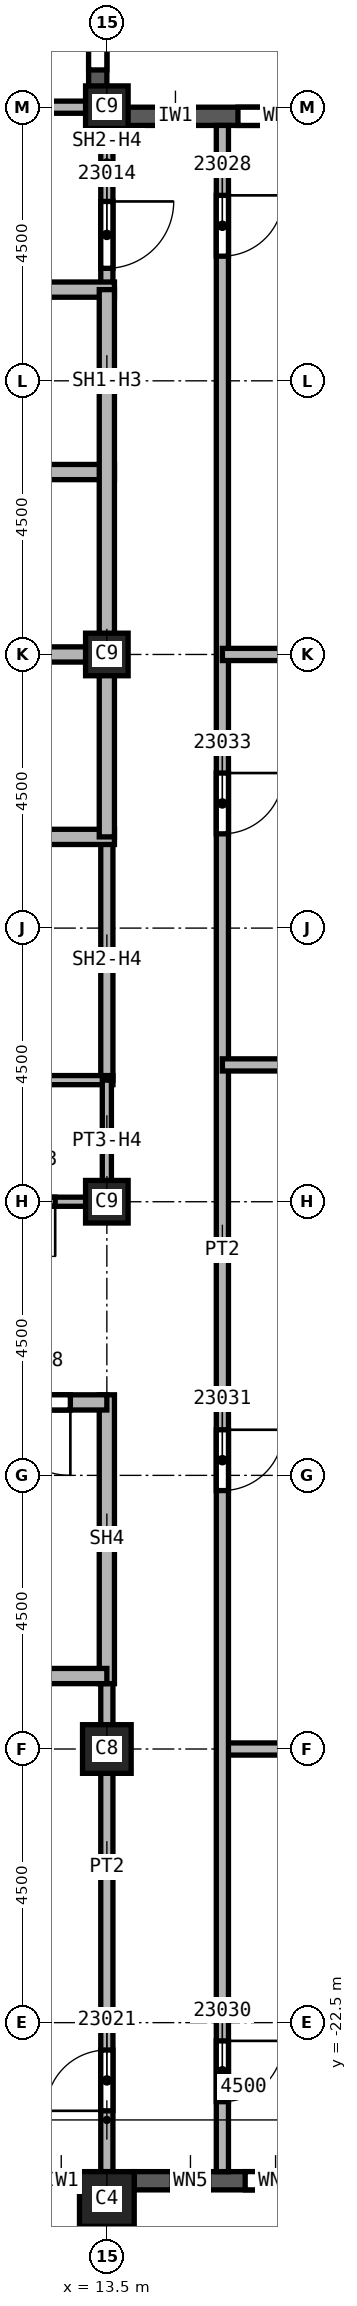
"""IFC4 building model, lengths in metres.
Left out: names, types, materials, properties, quantities, classifications, styles, units other than length and angle.
Written with IfcOpenShell. Run it as: python <this file> out.ifc"""

import sys

from ifc_helpers import new_model, si_unit, direction, frame, frame_2d, origin, origin_2d, place, context, subcontext, project, spatial, rectangle, extrude, element, fill, save


model = new_model("IFC4")
c1 = context("Model", 3, precision=1e-05, world=origin(), true_north=direction((0.0, 1.0)))
c2 = subcontext(c1, "Body", "Model", "MODEL_VIEW")
j1 = project(units=[si_unit("LENGTHUNIT", "METRE"), si_unit("PLANEANGLEUNIT", "RADIAN")], contexts=[c1])
p1 = place(None, origin())
s1 = spatial("IfcSite", under=j1, at=p1, CompositionType="ELEMENT")
p2 = place(p1, origin())
s2 = spatial("IfcBuilding", under=s1, at=p2, CompositionType="ELEMENT")
p3 = place(p2, frame((0.0, 0.0, 326.0)))
s3 = spatial("IfcBuildingStorey", under=s2, at=p3, CompositionType="ELEMENT", Elevation=326.0)
p4 = place(p3, frame((13.5, -18.0, 0.0), z_axis=(0.0, 0.0, 1.0), x_axis=(1.0, 0.0, 0.0)))
e1 = element("IfcColumn", 1, at=p4, inside=s3, PredefinedType="COLUMN", context=c2, shape_type="SweptSolid", body=[
    extrude(rectangle(XDim=0.8, YDim=0.8, at=origin_2d()), origin(), (0.0, 0.0, 1.0), 3.74),
])
for number, where, z_axis, x_axis in (
    (2, (13.5, 0.0, 0.0), (0.0, 0.0, 1.0), (1.0, 0.0, 0.0)),
    (3, (13.5, 9.0, 0.0), (0.0, 0.0, 1.0), (1.0, 0.0, 0.0)),
    (4, (13.5, -9.0, 0.0), (0.0, 0.0, 1.0), (1.0, 0.0, 0.0)),
):
    element("IfcColumn", number, at=place(p3, frame(where, z_axis=z_axis, x_axis=x_axis)), inside=s3, PredefinedType="COLUMN", context=c2, shape_type="SweptSolid", body=[
        extrude(rectangle(XDim=0.7, YDim=0.7, at=origin_2d()), origin(), (0.0, 0.0, 1.0), 3.74),
    ])
p5 = place(p3, frame((13.5, -25.4, 0.0), z_axis=(0.0, 0.0, 1.0), x_axis=(1.0, 0.0, 0.0)))
e5 = element("IfcColumn", 5, at=p5, inside=s3, PredefinedType="COLUMN", context=c2, shape_type="SweptSolid", body=[
    extrude(rectangle(XDim=0.9, YDim=0.9, at=origin_2d()), origin(), (0.0, 0.0, 1.0), 3.74),
])
p6 = place(p3, frame((9.45, -25.1, 0.0), z_axis=(0.0, 0.0, 1.0), x_axis=(1.0, 0.0, 0.0)))
e6 = element("IfcWall", 6, at=p6, inside=s3, PredefinedType="SOLIDWALL", context=c2, shape_type="SweptSolid", body=[
    extrude(rectangle(XDim=3.6, YDim=0.3, at=frame_2d((1.8, 0.0))), origin(), (0.0, 0.0, 1.0), 3.14),
])
p7 = place(p6, frame((0.6, 0.0, 0.8)))
e7 = element("IfcOpeningElement", 7, at=p7, cuts=e6, PredefinedType="OPENING", context=c2, shape_type="SweptSolid", body=[
    extrude(rectangle(XDim=2.4, YDim=1.95, at=frame_2d((1.2, 0.975))), frame((0.0, 0.15, 0.0), z_axis=(0.0, -1.0, 0.0), x_axis=(1.0, 0.0, 0.0)), (0.0, 0.0, 1.0), 0.3),
])
p8 = place(p3, frame((13.95, -25.1, 0.0), z_axis=(0.0, 0.0, 1.0), x_axis=(1.0, 0.0, 0.0)))
e8 = element("IfcWall", 8, at=p8, inside=s3, PredefinedType="SOLIDWALL", context=c2, shape_type="SweptSolid", body=[
    extrude(rectangle(XDim=3.6, YDim=0.3, at=frame_2d((1.8, 0.0))), origin(), (0.0, 0.0, 1.0), 3.14),
])
p9 = place(p8, frame((0.625, 0.0, 0.8)))
e9 = element("IfcOpeningElement", 9, at=p9, cuts=e8, PredefinedType="OPENING", context=c2, shape_type="SweptSolid", body=[
    extrude(rectangle(XDim=0.6, YDim=1.95, at=frame_2d((0.3, 0.975))), frame((0.0, 0.15, 0.0), z_axis=(0.0, -1.0, 0.0), x_axis=(1.0, 0.0, 0.0)), (0.0, 0.0, 1.0), 0.3),
])
p10 = place(p8, frame((1.825, 0.0, 0.8)))
e10 = element("IfcOpeningElement", 10, at=p10, cuts=e8, PredefinedType="OPENING", context=c2, shape_type="SweptSolid", body=[
    extrude(rectangle(XDim=1.0, YDim=1.95, at=frame_2d((0.5, 0.975))), frame((0.0, 0.15, 0.0), z_axis=(0.0, -1.0, 0.0), x_axis=(1.0, 0.0, 0.0)), (0.0, 0.0, 1.0), 0.3),
])
p11 = place(p3, frame((13.35, 9.05, 0.0), z_axis=(0.0, 0.0, 1.0), x_axis=(0.0, 1.0, 0.0)))
e11 = element("IfcWall", 11, at=p11, inside=s3, PredefinedType="SOLIDWALL", context=c2, shape_type="SweptSolid", body=[
    extrude(rectangle(XDim=8.55, YDim=0.3, at=frame_2d((4.275, 0.0))), origin(), (0.0, 0.0, 1.0), 3.14),
])
p12 = place(p11, frame((0.562, 0.0, 0.8)))
e12 = element("IfcOpeningElement", 12, at=p12, cuts=e11, PredefinedType="OPENING", context=c2, shape_type="SweptSolid", body=[
    extrude(rectangle(XDim=2.4, YDim=1.95, at=frame_2d((1.2, 0.975))), frame((0.0, 0.15, 0.0), z_axis=(0.0, -1.0, 0.0), x_axis=(1.0, 0.0, 0.0)), (0.0, 0.0, 1.0), 0.3),
])
p13 = place(p11, frame((4.688, 0.0, 0.8)))
e13 = element("IfcOpeningElement", 13, at=p13, cuts=e11, PredefinedType="OPENING", context=c2, shape_type="SweptSolid", body=[
    extrude(rectangle(XDim=2.4, YDim=1.95, at=frame_2d((1.2, 0.975))), frame((0.0, 0.15, 0.0), z_axis=(0.0, -1.0, 0.0), x_axis=(1.0, 0.0, 0.0)), (0.0, 0.0, 1.0), 0.3),
])
p14 = place(p3, frame((22.1, 8.85, 0.0), z_axis=(0.0, 0.0, 1.0), x_axis=(-1.0, 0.0, 0.0)))
e14 = element("IfcWall", 14, at=p14, inside=s3, PredefinedType="SOLIDWALL", context=c2, shape_type="SweptSolid", body=[
    extrude(rectangle(XDim=8.55, YDim=0.3, at=frame_2d((4.275, 0.0))), origin(), (0.0, 0.0, 1.0), 3.14),
])
p15 = place(p14, frame((1.756, 0.0, 0.8)))
e15 = element("IfcOpeningElement", 15, at=p15, cuts=e14, PredefinedType="OPENING", context=c2, shape_type="SweptSolid", body=[
    extrude(rectangle(XDim=1.4, YDim=1.95, at=frame_2d((0.7, 0.975))), frame((0.0, 0.15, 0.0), z_axis=(0.0, -1.0, 0.0), x_axis=(1.0, 0.0, 0.0)), (0.0, 0.0, 1.0), 0.3),
])
p16 = place(p14, frame((5.044, 0.0, 0.8)))
e16 = element("IfcOpeningElement", 16, at=p16, cuts=e14, PredefinedType="OPENING", context=c2, shape_type="SweptSolid", body=[
    extrude(rectangle(XDim=1.4, YDim=1.95, at=frame_2d((0.7, 0.975))), frame((0.0, 0.15, 0.0), z_axis=(0.0, -1.0, 0.0), x_axis=(1.0, 0.0, 0.0)), (0.0, 0.0, 1.0), 0.3),
])
p17 = place(p3, frame((13.5, -24.95, 0.0), z_axis=(0.0, 0.0, 1.0), x_axis=(0.0, 1.0, 0.0)))
e17 = element("IfcWall", 17, at=p17, inside=s3, PredefinedType="PARTITIONING", context=c2, shape_type="SweptSolid", body=[
    extrude(rectangle(XDim=8.275, YDim=0.2, at=frame_2d((4.137, 0.0))), origin(), (0.0, 0.0, 1.0), 3.74),
])
p18 = place(p17, frame((1.0, 0.0, 0.0)))
e18 = element("IfcOpeningElement", 18, at=p18, cuts=e17, PredefinedType="OPENING", context=c2, shape_type="SweptSolid", body=[
    extrude(rectangle(XDim=1.0, YDim=2.1, at=frame_2d((0.5, 1.05))), frame((0.0, 0.1, 0.0), z_axis=(0.0, -1.0, 0.0), x_axis=(1.0, 0.0, 0.0)), (0.0, 0.0, 1.0), 0.2),
])
p19 = place(p3, frame((15.4, -18.0, 0.0), z_axis=(0.0, 0.0, 1.0), x_axis=(1.0, 0.0, 0.0)))
e19 = element("IfcWall", 19, at=p19, inside=s3, PredefinedType="PARTITIONING", context=c2, shape_type="SweptSolid", body=[
    extrude(rectangle(XDim=8.9, YDim=0.2, at=frame_2d((4.45, 0.0))), origin(), (0.0, 0.0, 1.0), 3.74),
])
p20 = place(p3, frame((15.4, 8.7, 0.0), z_axis=(0.0, 0.0, 1.0), x_axis=(0.0, -1.0, 0.0)))
e20 = element("IfcWall", 20, at=p20, inside=s3, PredefinedType="PARTITIONING", context=c2, shape_type="SweptSolid", body=[
    extrude(rectangle(XDim=33.65, YDim=0.2, at=frame_2d((16.825, 0.0))), origin(), (0.0, 0.0, 1.0), 3.74),
])
p21 = place(p20, frame((1.15, 0.0, 0.0)))
e21 = element("IfcOpeningElement", 21, at=p21, cuts=e20, PredefinedType="OPENING", context=c2, shape_type="SweptSolid", body=[
    extrude(rectangle(XDim=1.0, YDim=2.1, at=frame_2d((0.5, 1.05))), frame((0.0, 0.1, 0.0), z_axis=(0.0, -1.0, 0.0), x_axis=(1.0, 0.0, 0.0)), (0.0, 0.0, 1.0), 0.2),
])
p22 = place(p20, frame((31.5, 0.0, 0.0)))
e22 = element("IfcOpeningElement", 22, at=p22, cuts=e20, PredefinedType="OPENING", context=c2, shape_type="SweptSolid", body=[
    extrude(rectangle(XDim=1.0, YDim=2.1, at=frame_2d((0.5, 1.05))), frame((0.0, 0.1, 0.0), z_axis=(0.0, -1.0, 0.0), x_axis=(1.0, 0.0, 0.0)), (0.0, 0.0, 1.0), 0.2),
])
p23 = place(p20, frame((21.45, 0.0, 0.0)))
e23 = element("IfcOpeningElement", 23, at=p23, cuts=e20, PredefinedType="OPENING", context=c2, shape_type="SweptSolid", body=[
    extrude(rectangle(XDim=1.0, YDim=2.1, at=frame_2d((0.5, 1.05))), frame((0.0, 0.1, 0.0), z_axis=(0.0, -1.0, 0.0), x_axis=(1.0, 0.0, 0.0)), (0.0, 0.0, 1.0), 0.2),
])
p24 = place(p20, frame((10.65, 0.0, 0.0)))
e24 = element("IfcOpeningElement", 24, at=p24, cuts=e20, PredefinedType="OPENING", context=c2, shape_type="SweptSolid", body=[
    extrude(rectangle(XDim=1.0, YDim=2.1, at=frame_2d((0.5, 1.05))), frame((0.0, 0.1, 0.0), z_axis=(0.0, -1.0, 0.0), x_axis=(1.0, 0.0, 0.0)), (0.0, 0.0, 1.0), 0.2),
])
for number, where, z_axis, x_axis in (
    (25, (15.4, -6.75, 0.0), (0.0, 0.0, 1.0), (1.0, 0.0, 0.0)),
    (26, (26.55, 0.0, 0.0), (0.0, 0.0, 1.0), (-1.0, 0.0, 0.0)),
):
    element("IfcWall", number, at=place(p3, frame(where, z_axis=z_axis, x_axis=x_axis)), inside=s3, PredefinedType="PARTITIONING", context=c2, shape_type="SweptSolid", body=[
        extrude(rectangle(XDim=11.15, YDim=0.2, at=frame_2d((5.575, 0.0))), origin(), (0.0, 0.0, 1.0), 3.74),
    ])
p25 = place(p3, frame((10.5, 9.0, 0.0), z_axis=(0.0, 0.0, 1.0), x_axis=(1.0, 0.0, 0.0)))
e27 = element("IfcWall", 27, at=p25, inside=s3, PredefinedType="SOLIDWALL", context=c2, shape_type="SweptSolid", body=[
    extrude(rectangle(XDim=3.0, YDim=0.2, at=frame_2d((1.5, 0.0))), origin(), (0.0, 0.0, 1.0), 3.062),
])
p26 = place(p3, frame((13.5, -3.0, 0.0), z_axis=(0.0, 0.0, 1.0), x_axis=(0.0, -1.0, 0.0)))
e28 = element("IfcWall", 28, at=p26, inside=s3, PredefinedType="SOLIDWALL", context=c2, shape_type="SweptSolid", body=[
    extrude(rectangle(XDim=4.0, YDim=0.2, at=frame_2d((2.0, 0.0))), origin(), (0.0, 0.0, 1.0), 3.062),
])
p27 = place(p3, frame((13.5, 9.05, 0.0), z_axis=(0.0, 0.0, 1.0), x_axis=(0.0, -1.0, 0.0)))
e29 = element("IfcWall", 29, at=p27, inside=s3, PredefinedType="SOLIDWALL", context=c2, shape_type="SweptSolid", body=[
    extrude(rectangle(XDim=3.05, YDim=0.2, at=frame_2d((1.525, 0.0))), origin(), (0.0, 0.0, 1.0), 3.062),
])
p28 = place(p27, frame((1.6, 0.0, 0.0)))
e30 = element("IfcOpeningElement", 30, at=p28, cuts=e29, PredefinedType="OPENING", context=c2, shape_type="SweptSolid", body=[
    extrude(rectangle(XDim=1.1, YDim=2.1, at=frame_2d((0.55, 1.05))), frame((0.0, 0.1, 0.0), z_axis=(0.0, -1.0, 0.0), x_axis=(1.0, 0.0, 0.0)), (0.0, 0.0, 1.0), 0.2),
])
p29 = place(p3, frame((7.5, -3.0, 0.0), z_axis=(0.0, 0.0, 1.0), x_axis=(1.0, 0.0, 0.0)))
e31 = element("IfcWall", 31, at=p29, inside=s3, PredefinedType="SOLIDWALL", context=c2, shape_type="SweptSolid", body=[
    extrude(rectangle(XDim=6.125, YDim=0.25, at=frame_2d((3.062, 0.0))), origin(), (0.0, 0.0, 1.0), 3.74),
])
p30 = place(p29, frame((1.75, 0.0, 0.0)))
e32 = element("IfcOpeningElement", 32, at=p30, cuts=e31, PredefinedType="OPENING", context=c2, shape_type="SweptSolid", body=[
    extrude(rectangle(XDim=1.1, YDim=2.1, at=frame_2d((0.55, 1.05))), frame((0.0, 0.125, 0.0), z_axis=(0.0, -1.0, 0.0), x_axis=(1.0, 0.0, 0.0)), (0.0, 0.0, 1.0), 0.25),
])
p31 = place(p3, frame((7.5, 3.0, 0.0), z_axis=(0.0, 0.0, 1.0), x_axis=(1.0, 0.0, 0.0)))
e33 = element("IfcWall", 33, at=p31, inside=s3, PredefinedType="SOLIDWALL", context=c2, shape_type="SweptSolid", body=[
    extrude(rectangle(XDim=6.125, YDim=0.25, at=frame_2d((3.062, 0.0))), origin(), (0.0, 0.0, 1.0), 3.74),
])
p32 = place(p31, frame((1.75, 0.0, 0.0)))
e34 = element("IfcOpeningElement", 34, at=p32, cuts=e33, PredefinedType="OPENING", context=c2, shape_type="SweptSolid", body=[
    extrude(rectangle(XDim=1.1, YDim=2.1, at=frame_2d((0.55, 1.05))), frame((0.0, 0.125, 0.0), z_axis=(0.0, -1.0, 0.0), x_axis=(1.0, 0.0, 0.0)), (0.0, 0.0, 1.0), 0.25),
])
for number, where, z_axis, x_axis in (
    (35, (10.5, 0.0, 0.0), (0.0, 0.0, 1.0), (1.0, 0.0, 0.0)),
    (36, (10.5, 6.0, 0.0), (0.0, 0.0, 1.0), (1.0, 0.0, 0.0)),
):
    element("IfcWall", number, at=place(p3, frame(where, z_axis=z_axis, x_axis=x_axis)), inside=s3, PredefinedType="SOLIDWALL", context=c2, shape_type="SweptSolid", body=[
        extrude(rectangle(XDim=3.125, YDim=0.25, at=frame_2d((1.562, 0.0))), origin(), (0.0, 0.0, 1.0), 3.74),
    ])
p33 = place(p3, frame((13.5, 6.0, 0.0), z_axis=(0.0, 0.0, 1.0), x_axis=(0.0, -1.0, 0.0)))
e37 = element("IfcWall", 37, at=p33, inside=s3, PredefinedType="SOLIDWALL", context=c2, shape_type="SweptSolid", body=[
    extrude(rectangle(XDim=9.0, YDim=0.25, at=frame_2d((4.5, 0.0))), origin(), (0.0, 0.0, 1.0), 3.062),
])
p34 = place(p3, frame((13.5, -16.925, 0.0), z_axis=(0.0, 0.0, 1.0), x_axis=(0.0, 1.0, 0.0)))
e38 = element("IfcWall", 38, at=p34, inside=s3, PredefinedType="SOLIDWALL", context=c2, shape_type="SweptSolid", body=[
    extrude(rectangle(XDim=4.75, YDim=0.25, at=frame_2d((2.375, 0.0))), origin(), (0.0, 0.0, 1.0), 3.74),
])
p35 = place(p3, frame((13.5, -16.8, 0.0), z_axis=(0.0, 0.0, 1.0), x_axis=(-1.0, 0.0, 0.0)))
e39 = element("IfcWall", 39, at=p35, inside=s3, PredefinedType="SOLIDWALL", context=c2, shape_type="SweptSolid", body=[
    extrude(rectangle(XDim=9.125, YDim=0.25, at=frame_2d((4.562, 0.0))), origin(), (0.0, 0.0, 1.0), 3.74),
])
p36 = place(p3, frame((13.5, -12.3, 0.0), z_axis=(0.0, 0.0, 1.0), x_axis=(-1.0, 0.0, 0.0)))
e40 = element("IfcWall", 40, at=p36, inside=s3, PredefinedType="SOLIDWALL", context=c2, shape_type="SweptSolid", body=[
    extrude(rectangle(XDim=9.125, YDim=0.25, at=frame_2d((4.562, 0.0))), origin(), (0.0, 0.0, 1.0), 3.74),
])
p37 = place(p36, frame((0.6, 0.0, 0.0)))
e41 = element("IfcOpeningElement", 41, at=p37, cuts=e40, PredefinedType="OPENING", context=c2, shape_type="SweptSolid", body=[
    extrude(rectangle(XDim=1.2, YDim=2.1, at=frame_2d((0.6, 1.05))), frame((0.0, 0.125, 0.0), z_axis=(0.0, -1.0, 0.0), x_axis=(1.0, 0.0, 0.0)), (0.0, 0.0, 1.0), 0.25),
])
p38 = place(p3, frame((10.5, -7.0, 0.0), z_axis=(0.0, 0.0, 1.0), x_axis=(1.0, 0.0, 0.0)))
e42 = element("IfcWall", 42, at=p38, inside=s3, PredefinedType="PARTITIONING", context=c2, shape_type="SweptSolid", body=[
    extrude(rectangle(XDim=3.1, YDim=0.15, at=frame_2d((1.55, 0.0))), origin(), (0.0, 0.0, 1.0), 3.74),
])
p39 = place(p3, frame((13.5, -9.0, 0.0), z_axis=(0.0, 0.0, 1.0), x_axis=(-1.0, 0.0, 0.0)))
e43 = element("IfcWall", 43, at=p39, inside=s3, PredefinedType="PARTITIONING", context=c2, shape_type="SweptSolid", body=[
    extrude(rectangle(XDim=3.0, YDim=0.15, at=frame_2d((1.5, 0.0))), origin(), (0.0, 0.0, 1.0), 3.062),
])
p40 = place(p39, frame((0.85, 0.0, 0.0)))
e44 = element("IfcOpeningElement", 44, at=p40, cuts=e43, PredefinedType="OPENING", context=c2, shape_type="SweptSolid", body=[
    extrude(rectangle(XDim=0.9, YDim=2.1, at=frame_2d((0.45, 1.05))), frame((0.0, 0.075, 0.0), z_axis=(0.0, -1.0, 0.0), x_axis=(1.0, 0.0, 0.0)), (0.0, 0.0, 1.0), 0.15),
])
p41 = place(p3, frame((13.5, -7.0, 0.0), z_axis=(0.0, 0.0, 1.0), x_axis=(0.0, -1.0, 0.0)))
e45 = element("IfcWall", 45, at=p41, inside=s3, PredefinedType="PARTITIONING", context=c2, shape_type="SweptSolid", body=[
    extrude(rectangle(XDim=2.075, YDim=0.15, at=frame_2d((1.038, 0.0))), origin(), (0.0, 0.0, 1.0), 3.062),
])
p42 = place(p12, origin())
e46 = element("IfcWindow", 46, at=p42, inside=s3, PartitioningType="SINGLE_PANEL", PredefinedType="WINDOW", context=c2, shape_type="SweptSolid", body=[
    extrude(rectangle(XDim=2.4, YDim=1.95, at=frame_2d((1.2, 0.975))), frame((0.0, 0.03, 0.0), z_axis=(0.0, -1.0, 0.0), x_axis=(1.0, 0.0, 0.0)), (0.0, 0.0, 1.0), 0.06),
])
fill(e12, e46)
p43 = place(p40, origin())
e47 = element("IfcDoor", 47, at=p43, inside=s3, OperationType="SINGLE_SWING_RIGHT", PredefinedType="DOOR", context=c2, shape_type="SweptSolid", body=[
    extrude(rectangle(XDim=0.9, YDim=2.1, at=frame_2d((0.45, 1.05))), frame((0.0, 0.025, 0.0), z_axis=(0.0, -1.0, 0.0), x_axis=(1.0, 0.0, 0.0)), (0.0, 0.0, 1.0), 0.05),
])
fill(e44, e47)
p44 = place(p28, origin())
e48 = element("IfcDoor", 48, at=p44, inside=s3, OperationType="SINGLE_SWING_LEFT", PredefinedType="DOOR", context=c2, shape_type="SweptSolid", body=[
    extrude(rectangle(XDim=1.1, YDim=2.1, at=frame_2d((0.55, 1.05))), frame((0.0, 0.025, 0.0), z_axis=(0.0, -1.0, 0.0), x_axis=(1.0, 0.0, 0.0)), (0.0, 0.0, 1.0), 0.05),
])
fill(e30, e48)
p45 = place(p37, origin())
e49 = element("IfcDoor", 49, at=p45, inside=s3, OperationType="SINGLE_SWING_LEFT", PredefinedType="DOOR", context=c2, shape_type="SweptSolid", body=[
    extrude(rectangle(XDim=1.2, YDim=2.1, at=frame_2d((0.6, 1.05))), frame((0.0, 0.025, 0.0), z_axis=(0.0, -1.0, 0.0), x_axis=(1.0, 0.0, 0.0)), (0.0, 0.0, 1.0), 0.05),
])
fill(e41, e49)
p46 = place(p18, origin())
e50 = element("IfcDoor", 50, at=p46, inside=s3, OperationType="SINGLE_SWING_RIGHT", PredefinedType="DOOR", context=c2, shape_type="SweptSolid", body=[
    extrude(rectangle(XDim=1.0, YDim=2.1, at=frame_2d((0.5, 1.05))), frame((0.0, 0.025, 0.0), z_axis=(0.0, -1.0, 0.0), x_axis=(1.0, 0.0, 0.0)), (0.0, 0.0, 1.0), 0.05),
])
fill(e18, e50)
p47 = place(p21, origin())
e51 = element("IfcDoor", 51, at=p47, inside=s3, OperationType="SINGLE_SWING_LEFT", PredefinedType="DOOR", context=c2, shape_type="SweptSolid", body=[
    extrude(rectangle(XDim=1.0, YDim=2.1, at=frame_2d((0.5, 1.05))), frame((0.0, 0.025, 0.0), z_axis=(0.0, -1.0, 0.0), x_axis=(1.0, 0.0, 0.0)), (0.0, 0.0, 1.0), 0.05),
])
fill(e21, e51)
p48 = place(p22, origin())
e52 = element("IfcDoor", 52, at=p48, inside=s3, OperationType="SINGLE_SWING_LEFT", PredefinedType="DOOR", context=c2, shape_type="SweptSolid", body=[
    extrude(rectangle(XDim=1.0, YDim=2.1, at=frame_2d((0.5, 1.05))), frame((0.0, 0.025, 0.0), z_axis=(0.0, -1.0, 0.0), x_axis=(1.0, 0.0, 0.0)), (0.0, 0.0, 1.0), 0.05),
])
fill(e22, e52)
p49 = place(p23, origin())
e53 = element("IfcDoor", 53, at=p49, inside=s3, OperationType="SINGLE_SWING_RIGHT", PredefinedType="DOOR", context=c2, shape_type="SweptSolid", body=[
    extrude(rectangle(XDim=1.0, YDim=2.1, at=frame_2d((0.5, 1.05))), frame((0.0, 0.025, 0.0), z_axis=(0.0, -1.0, 0.0), x_axis=(1.0, 0.0, 0.0)), (0.0, 0.0, 1.0), 0.05),
])
fill(e23, e53)
p50 = place(p24, origin())
e54 = element("IfcDoor", 54, at=p50, inside=s3, OperationType="SINGLE_SWING_RIGHT", PredefinedType="DOOR", context=c2, shape_type="SweptSolid", body=[
    extrude(rectangle(XDim=1.0, YDim=2.1, at=frame_2d((0.5, 1.05))), frame((0.0, 0.025, 0.0), z_axis=(0.0, -1.0, 0.0), x_axis=(1.0, 0.0, 0.0)), (0.0, 0.0, 1.0), 0.05),
])
fill(e24, e54)
p51 = place(p9, origin())
e55 = element("IfcWindow", 55, at=p51, inside=s3, PartitioningType="SINGLE_PANEL", PredefinedType="WINDOW", context=c2, shape_type="SweptSolid", body=[
    extrude(rectangle(XDim=0.6, YDim=1.95, at=frame_2d((0.3, 0.975))), frame((0.0, 0.03, 0.0), z_axis=(0.0, -1.0, 0.0), x_axis=(1.0, 0.0, 0.0)), (0.0, 0.0, 1.0), 0.06),
])
fill(e9, e55)
p52 = place(p10, origin())
e56 = element("IfcWindow", 56, at=p52, inside=s3, PartitioningType="SINGLE_PANEL", PredefinedType="WINDOW", context=c2, shape_type="SweptSolid", body=[
    extrude(rectangle(XDim=1.0, YDim=1.95, at=frame_2d((0.5, 0.975))), frame((0.0, 0.03, 0.0), z_axis=(0.0, -1.0, 0.0), x_axis=(1.0, 0.0, 0.0)), (0.0, 0.0, 1.0), 0.06),
])
fill(e10, e56)
p53 = place(p16, origin())
e57 = element("IfcWindow", 57, at=p53, inside=s3, PartitioningType="SINGLE_PANEL", PredefinedType="WINDOW", context=c2, shape_type="SweptSolid", body=[
    extrude(rectangle(XDim=1.4, YDim=1.95, at=frame_2d((0.7, 0.975))), frame((0.0, 0.03, 0.0), z_axis=(0.0, -1.0, 0.0), x_axis=(1.0, 0.0, 0.0)), (0.0, 0.0, 1.0), 0.06),
])
fill(e16, e57)
save(model, sys.argv[1])
